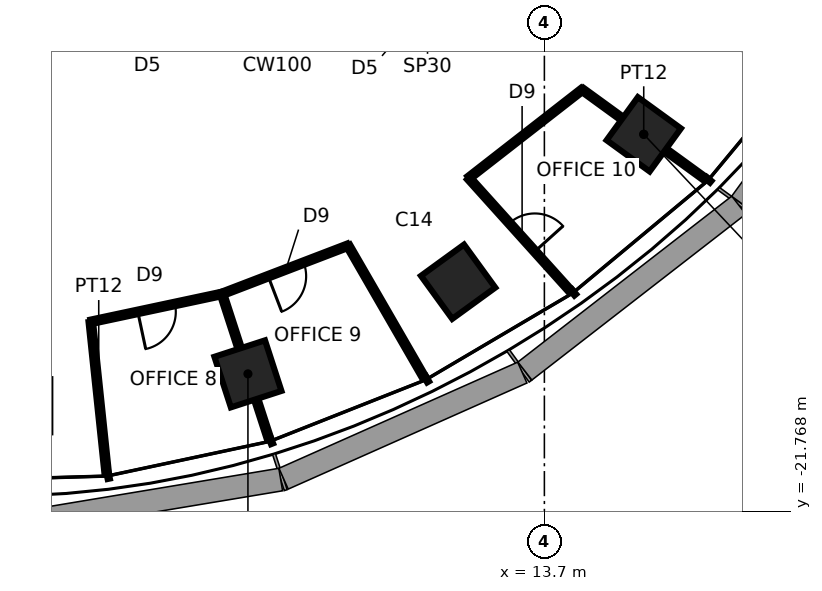
"""IFC4 building model, lengths in metres.
Left out: names, types, materials, properties, quantities, classifications, styles, units other than length and angle.
Written with IfcOpenShell. Run it as: python <this file> out.ifc"""

import sys

from ifc_helpers import new_model, si_unit, direction, frame, frame_2d, origin, origin_2d, place, context, subcontext, project, spatial, rectangle, extrude, element, fill, save


model = new_model("IFC4")
c1 = context("Model", 3, precision=1e-05, world=origin(), true_north=direction((0.0, 1.0)))
c2 = subcontext(c1, "Body", "Model", "MODEL_VIEW")
j1 = project(units=[si_unit("LENGTHUNIT", "METRE"), si_unit("PLANEANGLEUNIT", "RADIAN")], contexts=[c1])
p1 = place(None, origin())
s1 = spatial("IfcSite", under=j1, at=p1, CompositionType="ELEMENT")
p2 = place(p1, origin())
s2 = spatial("IfcBuilding", under=s1, at=p2, CompositionType="ELEMENT")
p3 = place(p2, frame((0.0, 0.0, 187.7)))
s3 = spatial("IfcBuildingStorey", under=s2, at=p3, CompositionType="ELEMENT", Elevation=187.7)
for number, where, z_axis, x_axis in (
    (1, (5.9, -18.157, 0.0), (0.0, 0.0, 1.0), (0.309, -0.951, 0.0)),
    (2, (11.43, -15.733, 0.0), (0.0, 0.0, 1.0), (0.588, -0.809, 0.0)),
    (3, (16.315, -11.854, 0.0), (0.0, 0.0, 1.0), (0.809, -0.588, 0.0)),
):
    element("IfcColumn", number, at=place(p3, frame(where, z_axis=z_axis, x_axis=x_axis)), inside=s3, PredefinedType="COLUMN", context=c2, shape_type="SweptSolid", body=[
        extrude(rectangle(XDim=1.4, YDim=1.4, at=origin_2d()), origin(), (0.0, 0.0, 1.0), 3.9),
    ])
p4 = place(p3, frame((1.765, -16.789, 0.0), z_axis=(0.0, 0.0, 1.0), x_axis=(0.104494148666, -0.99452550138, 0.0)))
e4 = element("IfcWall", 4, at=p4, inside=s3, PredefinedType="PARTITIONING", context=c2, shape_type="SweptSolid", body=[
    extrude(rectangle(XDim=4.0, YDim=0.12, at=frame_2d((2.0, 0.0))), origin(), (0.0, 0.0, 1.0), 3.74),
])
p5 = place(p3, frame((5.216, -16.053, 0.0), z_axis=(0.0, 0.0, 1.0), x_axis=(-0.978033661385, -0.208447012927, 0.0)))
e5 = element("IfcWall", 5, at=p5, inside=s3, PredefinedType="PARTITIONING", context=c2, shape_type="SweptSolid", body=[
    extrude(rectangle(XDim=3.529, YDim=0.12, at=frame_2d((1.765, 0.0))), origin(), (0.0, 0.0, 1.0), 3.74),
])
p6 = place(p5, frame((1.264, 0.0, 0.0)))
e6 = element("IfcOpeningElement", 6, at=p6, cuts=e5, PredefinedType="OPENING", context=c2, shape_type="SweptSolid", body=[
    extrude(rectangle(XDim=1.0, YDim=2.4, at=frame_2d((0.5, 1.2))), frame((0.0, 0.07, 0.0), z_axis=(0.0, -1.0, 0.0), x_axis=(1.0, 0.0, 0.0)), (0.0, 0.0, 1.0), 0.14),
])
p7 = place(p3, frame((5.216, -16.053, 0.0), z_axis=(0.0, 0.0, 1.0), x_axis=(0.309022586479, -0.951054699292, 0.0)))
e7 = element("IfcWall", 7, at=p7, inside=s3, PredefinedType="PARTITIONING", context=c2, shape_type="SweptSolid", body=[
    extrude(rectangle(XDim=4.0, YDim=0.12, at=frame_2d((2.0, 0.0))), origin(), (0.0, 0.0, 1.0), 3.04),
])
p8 = place(p3, frame((8.534, -14.782, 0.0), z_axis=(0.0, 0.0, 1.0), x_axis=(-0.933789357777, -0.357823190001, 0.0)))
e8 = element("IfcWall", 8, at=p8, inside=s3, PredefinedType="PARTITIONING", context=c2, shape_type="SweptSolid", body=[
    extrude(rectangle(XDim=3.553, YDim=0.12, at=frame_2d((1.777, 0.0))), origin(), (0.0, 0.0, 1.0), 3.74),
])
p9 = place(p8, frame((1.252, 0.0, 0.0)))
e9 = element("IfcOpeningElement", 9, at=p9, cuts=e8, PredefinedType="OPENING", context=c2, shape_type="SweptSolid", body=[
    extrude(rectangle(XDim=1.0, YDim=2.4, at=frame_2d((0.5, 1.2))), frame((0.0, 0.07, 0.0), z_axis=(0.0, -1.0, 0.0), x_axis=(1.0, 0.0, 0.0)), (0.0, 0.0, 1.0), 0.14),
])
p10 = place(p3, frame((10.534, -18.246, 0.0), z_axis=(0.0, 0.0, 1.0), x_axis=(-0.49999894854, 0.866026010844, 0.0)))
e10 = element("IfcWall", 10, at=p10, inside=s3, PredefinedType="PARTITIONING", context=c2, shape_type="SweptSolid", body=[
    extrude(rectangle(XDim=4.0, YDim=0.12, at=frame_2d((2.0, 0.0))), origin(), (0.0, 0.0, 1.0), 3.74),
])
p11 = place(p3, frame((11.709, -13.004, 0.0), z_axis=(0.0, 0.0, 1.0), x_axis=(0.669150182773, -0.743127198328, 0.0)))
e11 = element("IfcWall", 11, at=p11, inside=s3, PredefinedType="PARTITIONING", context=c2, shape_type="SweptSolid", body=[
    extrude(rectangle(XDim=4.0, YDim=0.12, at=frame_2d((2.0, 0.0))), origin(), (0.0, 0.0, 1.0), 3.74),
])
p12 = place(p11, frame((1.6, 0.0, 0.0)))
e12 = element("IfcOpeningElement", 12, at=p12, cuts=e11, PredefinedType="OPENING", context=c2, shape_type="SweptSolid", body=[
    extrude(rectangle(XDim=1.0, YDim=2.4, at=frame_2d((0.5, 1.2))), frame((0.0, 0.07, 0.0), z_axis=(0.0, -1.0, 0.0), x_axis=(1.0, 0.0, 0.0)), (0.0, 0.0, 1.0), 0.14),
])
p13 = place(p3, frame((14.696, -10.677, 0.0), z_axis=(0.0, 0.0, 1.0), x_axis=(-0.788973621164, -0.614427070617, 0.0)))
e13 = element("IfcWall", 13, at=p13, inside=s3, PredefinedType="PARTITIONING", context=c2, shape_type="SweptSolid", body=[
    extrude(rectangle(XDim=3.786, YDim=0.12, at=frame_2d((1.893, 0.0))), origin(), (0.0, 0.0, 1.0), 3.74),
])
p14 = place(p3, frame((17.932, -13.029, 0.0), z_axis=(0.0, 0.0, 1.0), x_axis=(-0.809026317077, 0.587772420479, 0.0)))
e14 = element("IfcWall", 14, at=p14, inside=s3, PredefinedType="PARTITIONING", context=c2, shape_type="SweptSolid", body=[
    extrude(rectangle(XDim=4.0, YDim=0.12, at=frame_2d((2.0, 0.0))), origin(), (0.0, 0.0, 1.0), 3.04),
])
p15 = place(p6, origin())
e15 = element("IfcDoor", 15, at=p15, inside=s3, OperationType="SINGLE_SWING_RIGHT", PredefinedType="DOOR", context=c2, shape_type="SweptSolid", body=[
    extrude(rectangle(XDim=1.0, YDim=2.4, at=frame_2d((0.5, 1.2))), frame((0.0, 0.025, 0.0), z_axis=(0.0, -1.0, 0.0), x_axis=(1.0, 0.0, 0.0)), (0.0, 0.0, 1.0), 0.05),
])
fill(e6, e15)
p16 = place(p9, origin())
e16 = element("IfcDoor", 16, at=p16, inside=s3, OperationType="SINGLE_SWING_RIGHT", PredefinedType="DOOR", context=c2, shape_type="SweptSolid", body=[
    extrude(rectangle(XDim=1.0, YDim=2.4, at=frame_2d((0.5, 1.2))), frame((0.0, 0.025, 0.0), z_axis=(0.0, -1.0, 0.0), x_axis=(1.0, 0.0, 0.0)), (0.0, 0.0, 1.0), 0.05),
])
fill(e9, e16)
p17 = place(p12, origin())
e17 = element("IfcDoor", 17, at=p17, inside=s3, OperationType="SINGLE_SWING_RIGHT", PredefinedType="DOOR", context=c2, shape_type="SweptSolid", body=[
    extrude(rectangle(XDim=1.0, YDim=2.4, at=frame_2d((0.5, 1.2))), frame((0.0, 0.025, 0.0), z_axis=(0.0, -1.0, 0.0), x_axis=(1.0, 0.0, 0.0)), (0.0, 0.0, 1.0), 0.05),
])
fill(e12, e17)
save(model, sys.argv[1])
